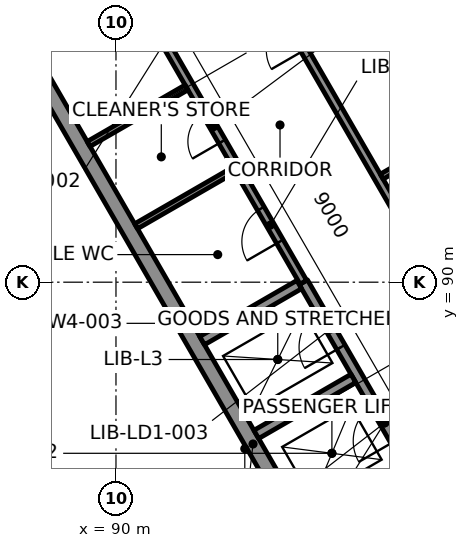
"""IFC4 building model, lengths in metres.
Left out: names, types, materials, properties, quantities, classifications, styles, units other than length and angle.
Written with IfcOpenShell. Run it as: python <this file> out.ifc"""

import sys

from ifc_helpers import new_model, si_unit, direction, frame, frame_2d, origin, origin_2d, place, context, subcontext, project, spatial, rectangle, extrude, element, fill, save


model = new_model("IFC4")
c1 = context("Model", 3, precision=1e-05, world=origin(), true_north=direction((0.0, 1.0)))
c2 = subcontext(c1, "Body", "Model", "MODEL_VIEW")
j1 = project(units=[si_unit("LENGTHUNIT", "METRE"), si_unit("PLANEANGLEUNIT", "RADIAN")], contexts=[c1])
p1 = place(None, origin())
s1 = spatial("IfcSite", under=j1, at=p1, CompositionType="ELEMENT")
p2 = place(p1, origin())
s2 = spatial("IfcBuilding", under=s1, at=p2, CompositionType="ELEMENT")
p3 = place(p2, origin())
s3 = spatial("IfcBuildingStorey", under=s2, at=p3, CompositionType="ELEMENT", Elevation=0.0)
for number, where, z_axis, x_axis in (
    (1, (92.22, 84.942, 0.0), (0.0, 0.0, 1.0), (-0.5, 0.866, 0.0)),
    (2, (87.421, 93.256, 0.0), (0.0, 0.0, 1.0), (-0.5, 0.866, 0.0)),
):
    element("IfcColumn", number, at=place(p3, frame(where, z_axis=z_axis, x_axis=x_axis)), inside=s3, PredefinedType="COLUMN", context=c2, shape_type="SweptSolid", body=[
        extrude(rectangle(XDim=1.2, YDim=1.5, at=origin_2d()), origin(), (0.0, 0.0, 1.0), 8.0),
    ])
p4 = place(p3, frame((81.775, 87.5, 0.0), z_axis=(0.0, 0.0, 1.0), x_axis=(1.0, 0.0, 0.0)))
e3 = element("IfcWall", 3, at=p4, inside=s3, PredefinedType="PARTITIONING", context=c2, shape_type="SweptSolid", body=[
    extrude(rectangle(XDim=9.662, YDim=0.15, at=frame_2d((4.831, 0.0))), origin(), (0.0, 0.0, 1.0), 6.865),
])
p5 = place(p4, frame((4.381, 0.0, 0.0)))
e4 = element("IfcOpeningElement", 4, at=p5, cuts=e3, PredefinedType="OPENING", context=c2, shape_type="SweptSolid", body=[
    extrude(rectangle(XDim=0.9, YDim=2.1, at=frame_2d((0.45, 1.05))), frame((0.0, 0.085, 0.0), z_axis=(0.0, -1.0, 0.0), x_axis=(1.0, 0.0, 0.0)), (0.0, 0.0, 1.0), 0.17),
])
p6 = place(p3, frame((91.5, 85.219, 0.0), z_axis=(0.0, 0.0, 1.0), x_axis=(0.0, 1.0, 0.0)))
e5 = element("IfcWall", 5, at=p6, inside=s3, PredefinedType="PARTITIONING", context=c2, shape_type="SweptSolid", body=[
    extrude(rectangle(XDim=2.17, YDim=0.15, at=frame_2d((1.085, 0.0))), origin(), (0.0, 0.0, 1.0), 6.865),
])
p7 = place(p3, frame((91.425, 84.821, 0.0), z_axis=(0.0, 0.0, 1.0), x_axis=(-0.4998141712, 0.866132665513, 0.0)))
e6 = element("IfcWall", 6, at=p7, inside=s3, PredefinedType="PARTITIONING", context=c2, shape_type="SweptSolid", body=[
    extrude(rectangle(XDim=0.307, YDim=0.15, at=frame_2d((0.154, 0.0))), origin(), (0.0, 0.0, 1.0), 7.1),
])
p8 = place(p3, frame((107.504, 60.451, 0.0), z_axis=(0.0, 0.0, 1.0), x_axis=(-0.500000550228, 0.86602508611, 0.0)))
e7 = element("IfcWall", 7, at=p8, inside=s3, PredefinedType="SOLIDWALL", context=c2, shape_type="SweptSolid", body=[
    extrude(rectangle(XDim=57.704, YDim=0.3, at=frame_2d((28.852, 0.0))), origin(), (0.0, 0.0, 1.0), 7.7),
])
p9 = place(p8, frame((56.104, 0.0, 0.0)))
e8 = element("IfcOpeningElement", 8, at=p9, cuts=e7, PredefinedType="OPENING", context=c2, shape_type="SweptSolid", body=[
    extrude(rectangle(XDim=1.2, YDim=2.4, at=frame_2d((0.6, 1.2))), frame((0.0, 0.16, 0.0), z_axis=(0.0, -1.0, 0.0), x_axis=(1.0, 0.0, 0.0)), (0.0, 0.0, 1.0), 0.32),
])
p10 = place(p8, frame((1.552, 0.0, 0.15)))
e9 = element("IfcOpeningElement", 9, at=p10, cuts=e7, PredefinedType="OPENING", context=c2, shape_type="SweptSolid", body=[
    extrude(rectangle(XDim=2.1, YDim=5.4, at=frame_2d((1.05, 2.7))), frame((0.0, 0.16, 0.0), z_axis=(0.0, -1.0, 0.0), x_axis=(1.0, 0.0, 0.0)), (0.0, 0.0, 1.0), 0.32),
])
p11 = place(p8, frame((4.052, 0.0, 0.15)))
e10 = element("IfcOpeningElement", 10, at=p11, cuts=e7, PredefinedType="OPENING", context=c2, shape_type="SweptSolid", body=[
    extrude(rectangle(XDim=2.1, YDim=5.4, at=frame_2d((1.05, 2.7))), frame((0.0, 0.16, 0.0), z_axis=(0.0, -1.0, 0.0), x_axis=(1.0, 0.0, 0.0)), (0.0, 0.0, 1.0), 0.32),
])
p12 = place(p8, frame((6.552, 0.0, 0.15)))
e11 = element("IfcOpeningElement", 11, at=p12, cuts=e7, PredefinedType="OPENING", context=c2, shape_type="SweptSolid", body=[
    extrude(rectangle(XDim=2.1, YDim=5.4, at=frame_2d((1.05, 2.7))), frame((0.0, 0.16, 0.0), z_axis=(0.0, -1.0, 0.0), x_axis=(1.0, 0.0, 0.0)), (0.0, 0.0, 1.0), 0.32),
])
p13 = place(p8, frame((9.052, 0.0, 0.15)))
e12 = element("IfcOpeningElement", 12, at=p13, cuts=e7, PredefinedType="OPENING", context=c2, shape_type="SweptSolid", body=[
    extrude(rectangle(XDim=2.1, YDim=5.4, at=frame_2d((1.05, 2.7))), frame((0.0, 0.16, 0.0), z_axis=(0.0, -1.0, 0.0), x_axis=(1.0, 0.0, 0.0)), (0.0, 0.0, 1.0), 0.32),
])
p14 = place(p8, frame((11.552, 0.0, 0.15)))
e13 = element("IfcOpeningElement", 13, at=p14, cuts=e7, PredefinedType="OPENING", context=c2, shape_type="SweptSolid", body=[
    extrude(rectangle(XDim=2.1, YDim=5.4, at=frame_2d((1.05, 2.7))), frame((0.0, 0.16, 0.0), z_axis=(0.0, -1.0, 0.0), x_axis=(1.0, 0.0, 0.0)), (0.0, 0.0, 1.0), 0.32),
])
p15 = place(p8, frame((14.052, 0.0, 0.15)))
e14 = element("IfcOpeningElement", 14, at=p15, cuts=e7, PredefinedType="OPENING", context=c2, shape_type="SweptSolid", body=[
    extrude(rectangle(XDim=2.1, YDim=5.4, at=frame_2d((1.05, 2.7))), frame((0.0, 0.16, 0.0), z_axis=(0.0, -1.0, 0.0), x_axis=(1.0, 0.0, 0.0)), (0.0, 0.0, 1.0), 0.32),
])
p16 = place(p8, frame((16.552, 0.0, 0.15)))
e15 = element("IfcOpeningElement", 15, at=p16, cuts=e7, PredefinedType="OPENING", context=c2, shape_type="SweptSolid", body=[
    extrude(rectangle(XDim=2.1, YDim=5.4, at=frame_2d((1.05, 2.7))), frame((0.0, 0.16, 0.0), z_axis=(0.0, -1.0, 0.0), x_axis=(1.0, 0.0, 0.0)), (0.0, 0.0, 1.0), 0.32),
])
p17 = place(p8, frame((19.052, 0.0, 0.15)))
e16 = element("IfcOpeningElement", 16, at=p17, cuts=e7, PredefinedType="OPENING", context=c2, shape_type="SweptSolid", body=[
    extrude(rectangle(XDim=2.1, YDim=5.4, at=frame_2d((1.05, 2.7))), frame((0.0, 0.16, 0.0), z_axis=(0.0, -1.0, 0.0), x_axis=(1.0, 0.0, 0.0)), (0.0, 0.0, 1.0), 0.32),
])
p18 = place(p8, frame((21.552, 0.0, 0.15)))
e17 = element("IfcOpeningElement", 17, at=p18, cuts=e7, PredefinedType="OPENING", context=c2, shape_type="SweptSolid", body=[
    extrude(rectangle(XDim=2.1, YDim=5.4, at=frame_2d((1.05, 2.7))), frame((0.0, 0.16, 0.0), z_axis=(0.0, -1.0, 0.0), x_axis=(1.0, 0.0, 0.0)), (0.0, 0.0, 1.0), 0.32),
])
p19 = place(p8, frame((24.052, 0.0, 0.15)))
e18 = element("IfcOpeningElement", 18, at=p19, cuts=e7, PredefinedType="OPENING", context=c2, shape_type="SweptSolid", body=[
    extrude(rectangle(XDim=2.1, YDim=5.4, at=frame_2d((1.05, 2.7))), frame((0.0, 0.16, 0.0), z_axis=(0.0, -1.0, 0.0), x_axis=(1.0, 0.0, 0.0)), (0.0, 0.0, 1.0), 0.32),
])
p20 = place(p8, frame((26.552, 0.0, 0.15)))
e19 = element("IfcOpeningElement", 19, at=p20, cuts=e7, PredefinedType="OPENING", context=c2, shape_type="SweptSolid", body=[
    extrude(rectangle(XDim=2.1, YDim=5.4, at=frame_2d((1.05, 2.7))), frame((0.0, 0.16, 0.0), z_axis=(0.0, -1.0, 0.0), x_axis=(1.0, 0.0, 0.0)), (0.0, 0.0, 1.0), 0.32),
])
p21 = place(p8, frame((29.052, 0.0, 0.15)))
e20 = element("IfcOpeningElement", 20, at=p21, cuts=e7, PredefinedType="OPENING", context=c2, shape_type="SweptSolid", body=[
    extrude(rectangle(XDim=2.1, YDim=5.4, at=frame_2d((1.05, 2.7))), frame((0.0, 0.16, 0.0), z_axis=(0.0, -1.0, 0.0), x_axis=(1.0, 0.0, 0.0)), (0.0, 0.0, 1.0), 0.32),
])
p22 = place(p8, frame((31.552, 0.0, 0.15)))
e21 = element("IfcOpeningElement", 21, at=p22, cuts=e7, PredefinedType="OPENING", context=c2, shape_type="SweptSolid", body=[
    extrude(rectangle(XDim=2.1, YDim=5.4, at=frame_2d((1.05, 2.7))), frame((0.0, 0.16, 0.0), z_axis=(0.0, -1.0, 0.0), x_axis=(1.0, 0.0, 0.0)), (0.0, 0.0, 1.0), 0.32),
])
p23 = place(p8, frame((34.052, 0.0, 0.15)))
e22 = element("IfcOpeningElement", 22, at=p23, cuts=e7, PredefinedType="OPENING", context=c2, shape_type="SweptSolid", body=[
    extrude(rectangle(XDim=2.1, YDim=5.4, at=frame_2d((1.05, 2.7))), frame((0.0, 0.16, 0.0), z_axis=(0.0, -1.0, 0.0), x_axis=(1.0, 0.0, 0.0)), (0.0, 0.0, 1.0), 0.32),
])
p24 = place(p8, frame((36.552, 0.0, 0.15)))
e23 = element("IfcOpeningElement", 23, at=p24, cuts=e7, PredefinedType="OPENING", context=c2, shape_type="SweptSolid", body=[
    extrude(rectangle(XDim=2.1, YDim=5.4, at=frame_2d((1.05, 2.7))), frame((0.0, 0.16, 0.0), z_axis=(0.0, -1.0, 0.0), x_axis=(1.0, 0.0, 0.0)), (0.0, 0.0, 1.0), 0.32),
])
p25 = place(p8, frame((39.052, 0.0, 0.15)))
e24 = element("IfcOpeningElement", 24, at=p25, cuts=e7, PredefinedType="OPENING", context=c2, shape_type="SweptSolid", body=[
    extrude(rectangle(XDim=2.1, YDim=5.4, at=frame_2d((1.05, 2.7))), frame((0.0, 0.16, 0.0), z_axis=(0.0, -1.0, 0.0), x_axis=(1.0, 0.0, 0.0)), (0.0, 0.0, 1.0), 0.32),
])
p26 = place(p8, frame((41.552, 0.0, 0.15)))
e25 = element("IfcOpeningElement", 25, at=p26, cuts=e7, PredefinedType="OPENING", context=c2, shape_type="SweptSolid", body=[
    extrude(rectangle(XDim=2.1, YDim=5.4, at=frame_2d((1.05, 2.7))), frame((0.0, 0.16, 0.0), z_axis=(0.0, -1.0, 0.0), x_axis=(1.0, 0.0, 0.0)), (0.0, 0.0, 1.0), 0.32),
])
p27 = place(p8, frame((44.052, 0.0, 0.15)))
e26 = element("IfcOpeningElement", 26, at=p27, cuts=e7, PredefinedType="OPENING", context=c2, shape_type="SweptSolid", body=[
    extrude(rectangle(XDim=2.1, YDim=5.4, at=frame_2d((1.05, 2.7))), frame((0.0, 0.16, 0.0), z_axis=(0.0, -1.0, 0.0), x_axis=(1.0, 0.0, 0.0)), (0.0, 0.0, 1.0), 0.32),
])
p28 = place(p8, frame((46.552, 0.0, 0.15)))
e27 = element("IfcOpeningElement", 27, at=p28, cuts=e7, PredefinedType="OPENING", context=c2, shape_type="SweptSolid", body=[
    extrude(rectangle(XDim=2.1, YDim=5.4, at=frame_2d((1.05, 2.7))), frame((0.0, 0.16, 0.0), z_axis=(0.0, -1.0, 0.0), x_axis=(1.0, 0.0, 0.0)), (0.0, 0.0, 1.0), 0.32),
])
p29 = place(p8, frame((49.052, 0.0, 0.15)))
e28 = element("IfcOpeningElement", 28, at=p29, cuts=e7, PredefinedType="OPENING", context=c2, shape_type="SweptSolid", body=[
    extrude(rectangle(XDim=2.1, YDim=5.4, at=frame_2d((1.05, 2.7))), frame((0.0, 0.16, 0.0), z_axis=(0.0, -1.0, 0.0), x_axis=(1.0, 0.0, 0.0)), (0.0, 0.0, 1.0), 0.32),
])
p30 = place(p8, frame((51.552, 0.0, 0.15)))
e29 = element("IfcOpeningElement", 29, at=p30, cuts=e7, PredefinedType="OPENING", context=c2, shape_type="SweptSolid", body=[
    extrude(rectangle(XDim=2.1, YDim=5.4, at=frame_2d((1.05, 2.7))), frame((0.0, 0.16, 0.0), z_axis=(0.0, -1.0, 0.0), x_axis=(1.0, 0.0, 0.0)), (0.0, 0.0, 1.0), 0.32),
])
p31 = place(p3, frame((107.106, 62.36, 0.0), z_axis=(0.0, 0.0, 1.0), x_axis=(-0.49999992739, 0.866025445706, 0.0)))
e30 = element("IfcWall", 30, at=p31, inside=s3, PredefinedType="SOLIDWALL", context=c2, shape_type="SweptSolid", body=[
    extrude(rectangle(XDim=54.0, YDim=0.4, at=frame_2d((27.0, 0.0))), origin(), (0.0, 0.0, 1.0), 7.64),
])
p32 = place(p3, frame((99.205, 82.595, 0.0), z_axis=(0.0, 0.0, 1.0), x_axis=(-0.500011643316, 0.866018681408, 0.0)))
e31 = element("IfcWall", 31, at=p32, inside=s3, PredefinedType="SOLIDWALL", context=c2, shape_type="SweptSolid", body=[
    extrude(rectangle(XDim=8.55, YDim=0.25, at=frame_2d((4.275, 0.0))), origin(), (0.0, 0.0, 1.0), 7.64),
])
p33 = place(p32, frame((0.875, 0.0, 0.0)))
e32 = element("IfcOpeningElement", 32, at=p33, cuts=e31, PredefinedType="OPENING", context=c2, shape_type="SweptSolid", body=[
    extrude(rectangle(XDim=1.1, YDim=2.1, at=frame_2d((0.55, 1.05))), frame((0.0, 0.135, 0.0), z_axis=(0.0, -1.0, 0.0), x_axis=(1.0, 0.0, 0.0)), (0.0, 0.0, 1.0), 0.27),
])
p34 = place(p32, frame((3.725, 0.0, 0.0)))
e33 = element("IfcOpeningElement", 33, at=p34, cuts=e31, PredefinedType="OPENING", context=c2, shape_type="SweptSolid", body=[
    extrude(rectangle(XDim=1.1, YDim=2.1, at=frame_2d((0.55, 1.05))), frame((0.0, 0.135, 0.0), z_axis=(0.0, -1.0, 0.0), x_axis=(1.0, 0.0, 0.0)), (0.0, 0.0, 1.0), 0.27),
])
p35 = place(p32, frame((6.575, 0.0, 0.0)))
e34 = element("IfcOpeningElement", 34, at=p35, cuts=e31, PredefinedType="OPENING", context=c2, shape_type="SweptSolid", body=[
    extrude(rectangle(XDim=1.1, YDim=2.1, at=frame_2d((0.55, 1.05))), frame((0.0, 0.135, 0.0), z_axis=(0.0, -1.0, 0.0), x_axis=(1.0, 0.0, 0.0)), (0.0, 0.0, 1.0), 0.27),
])
p36 = place(p3, frame((94.93, 90.0, 0.0), z_axis=(0.0, 0.0, 1.0), x_axis=(-0.499997667785, 0.866026750285, 0.0)))
e35 = element("IfcWall", 35, at=p36, inside=s3, PredefinedType="PARTITIONING", context=c2, shape_type="SweptSolid", body=[
    extrude(rectangle(XDim=14.59, YDim=0.2, at=frame_2d((7.295, 0.0))), origin(), (0.0, 0.0, 1.0), 7.64),
])
p37 = place(p36, frame((1.235, 0.0, 0.0)))
e36 = element("IfcOpeningElement", 36, at=p37, cuts=e35, PredefinedType="OPENING", context=c2, shape_type="SweptSolid", body=[
    extrude(rectangle(XDim=1.0, YDim=2.1, at=frame_2d((0.5, 1.05))), frame((0.0, 0.11, 0.0), z_axis=(0.0, -1.0, 0.0), x_axis=(1.0, 0.0, 0.0)), (0.0, 0.0, 1.0), 0.22),
])
p38 = place(p36, frame((4.275, 0.0, 0.0)))
e37 = element("IfcOpeningElement", 37, at=p38, cuts=e35, PredefinedType="OPENING", context=c2, shape_type="SweptSolid", body=[
    extrude(rectangle(XDim=0.9, YDim=2.1, at=frame_2d((0.45, 1.05))), frame((0.0, 0.11, 0.0), z_axis=(0.0, -1.0, 0.0), x_axis=(1.0, 0.0, 0.0)), (0.0, 0.0, 1.0), 0.22),
])
p39 = place(p36, frame((9.825, 0.0, 0.0)))
e38 = element("IfcOpeningElement", 38, at=p39, cuts=e35, PredefinedType="OPENING", context=c2, shape_type="SweptSolid", body=[
    extrude(rectangle(XDim=0.9, YDim=2.1, at=frame_2d((0.45, 1.05))), frame((0.0, 0.11, 0.0), z_axis=(0.0, -1.0, 0.0), x_axis=(1.0, 0.0, 0.0)), (0.0, 0.0, 1.0), 0.22),
])
for number, where, z_axis, x_axis in (
    (39, (95.117, 83.526, 0.0), (0.0, 0.0, 1.0), (0.866, 0.5, 0.0)),
    (40, (93.692, 85.994, 0.0), (0.0, 0.0, 1.0), (0.866, 0.5, 0.0)),
):
    element("IfcWall", number, at=place(p3, frame(where, z_axis=z_axis, x_axis=x_axis)), inside=s3, PredefinedType="SOLIDWALL", context=c2, shape_type="SweptSolid", body=[
        extrude(rectangle(XDim=2.95, YDim=0.25, at=frame_2d((1.475, 0.0))), origin(), (0.0, 0.0, 1.0), 7.64),
    ])
p40 = place(p3, frame((92.267, 88.462, 0.0), z_axis=(0.0, 0.0, 1.0), x_axis=(0.866024349092, 0.500001826776, 0.0)))
e41 = element("IfcWall", 41, at=p40, inside=s3, PredefinedType="SOLIDWALL", context=c2, shape_type="SweptSolid", body=[
    extrude(rectangle(XDim=2.95, YDim=0.25, at=frame_2d((1.475, 0.0))), origin(), (0.0, 0.0, 1.0), 7.64),
])
for number, where, z_axis, x_axis in (
    (42, (90.529, 91.471, 0.0), (0.0, 0.0, 1.0), (0.866, 0.5, 0.0)),
    (43, (89.279, 93.636, 0.0), (0.0, 0.0, 1.0), (0.866, 0.5, 0.0)),
):
    element("IfcWall", number, at=place(p3, frame(where, z_axis=z_axis, x_axis=x_axis)), inside=s3, PredefinedType="PARTITIONING", context=c2, shape_type="SweptSolid", body=[
        extrude(rectangle(XDim=2.975, YDim=0.15, at=frame_2d((1.488, 0.0))), origin(), (0.0, 0.0, 1.0), 7.64),
    ])
p41 = place(p3, frame((112.456, 65.794, 0.0), z_axis=(0.0, 0.0, 1.0), x_axis=(-0.499998559706, 0.866026235337, 0.0)))
e44 = element("IfcWall", 44, at=p41, inside=s3, PredefinedType="PARTITIONING", context=c2, shape_type="SweptSolid", body=[
    extrude(rectangle(XDim=53.4, YDim=0.2, at=frame_2d((26.7, 0.0))), origin(), (0.0, 0.0, 1.0), 7.64),
])
p42 = place(p41, frame((12.6, 0.0, 0.0)))
e45 = element("IfcOpeningElement", 45, at=p42, cuts=e44, PredefinedType="OPENING", context=c2, shape_type="SweptSolid", body=[
    extrude(rectangle(XDim=1.8, YDim=2.1, at=frame_2d((0.9, 1.05))), frame((0.0, 0.11, 0.0), z_axis=(0.0, -1.0, 0.0), x_axis=(1.0, 0.0, 0.0)), (0.0, 0.0, 1.0), 0.22),
])
p43 = place(p41, frame((25.8, 0.0, 0.0)))
e46 = element("IfcOpeningElement", 46, at=p43, cuts=e44, PredefinedType="OPENING", context=c2, shape_type="SweptSolid", body=[
    extrude(rectangle(XDim=1.8, YDim=2.1, at=frame_2d((0.9, 1.05))), frame((0.0, 0.11, 0.0), z_axis=(0.0, -1.0, 0.0), x_axis=(1.0, 0.0, 0.0)), (0.0, 0.0, 1.0), 0.22),
])
p44 = place(p41, frame((35.0, 0.0, 0.0)))
e47 = element("IfcOpeningElement", 47, at=p44, cuts=e44, PredefinedType="OPENING", context=c2, shape_type="SweptSolid", body=[
    extrude(rectangle(XDim=1.0, YDim=2.1, at=frame_2d((0.5, 1.05))), frame((0.0, 0.11, 0.0), z_axis=(0.0, -1.0, 0.0), x_axis=(1.0, 0.0, 0.0)), (0.0, 0.0, 1.0), 0.22),
])
p45 = place(p41, frame((45.75, 0.0, 0.0)))
e48 = element("IfcOpeningElement", 48, at=p45, cuts=e44, PredefinedType="OPENING", context=c2, shape_type="SweptSolid", body=[
    extrude(rectangle(XDim=1.8, YDim=2.1, at=frame_2d((0.9, 1.05))), frame((0.0, 0.11, 0.0), z_axis=(0.0, -1.0, 0.0), x_axis=(1.0, 0.0, 0.0)), (0.0, 0.0, 1.0), 0.22),
])
p46 = place(p3, frame((96.992, 92.778, 0.0), z_axis=(0.0, 0.0, 1.0), x_axis=(0.866027547497, 0.499996286962, 0.0)))
e49 = element("IfcWall", 49, at=p46, inside=s3, PredefinedType="PARTITIONING", context=c2, shape_type="SweptSolid", body=[
    extrude(rectangle(XDim=23.05, YDim=0.15, at=frame_2d((11.525, 0.0))), origin(), (0.0, 0.0, 1.0), 7.64),
])
p47 = place(p20, origin())
e50 = element("IfcWindow", 50, at=p47, inside=s3, PartitioningType="SINGLE_PANEL", PredefinedType="WINDOW", context=c2, shape_type="SweptSolid", body=[
    extrude(rectangle(XDim=2.1, YDim=5.4, at=frame_2d((1.05, 2.7))), frame((0.0, 0.03, 0.0), z_axis=(0.0, -1.0, 0.0), x_axis=(1.0, 0.0, 0.0)), (0.0, 0.0, 1.0), 0.06),
])
fill(e19, e50)
p48 = place(p21, origin())
e51 = element("IfcWindow", 51, at=p48, inside=s3, PartitioningType="SINGLE_PANEL", PredefinedType="WINDOW", context=c2, shape_type="SweptSolid", body=[
    extrude(rectangle(XDim=2.1, YDim=5.4, at=frame_2d((1.05, 2.7))), frame((0.0, 0.03, 0.0), z_axis=(0.0, -1.0, 0.0), x_axis=(1.0, 0.0, 0.0)), (0.0, 0.0, 1.0), 0.06),
])
fill(e20, e51)
p49 = place(p22, origin())
e52 = element("IfcWindow", 52, at=p49, inside=s3, PartitioningType="SINGLE_PANEL", PredefinedType="WINDOW", context=c2, shape_type="SweptSolid", body=[
    extrude(rectangle(XDim=2.1, YDim=5.4, at=frame_2d((1.05, 2.7))), frame((0.0, 0.03, 0.0), z_axis=(0.0, -1.0, 0.0), x_axis=(1.0, 0.0, 0.0)), (0.0, 0.0, 1.0), 0.06),
])
fill(e21, e52)
p50 = place(p23, origin())
e53 = element("IfcWindow", 53, at=p50, inside=s3, PartitioningType="SINGLE_PANEL", PredefinedType="WINDOW", context=c2, shape_type="SweptSolid", body=[
    extrude(rectangle(XDim=2.1, YDim=5.4, at=frame_2d((1.05, 2.7))), frame((0.0, 0.03, 0.0), z_axis=(0.0, -1.0, 0.0), x_axis=(1.0, 0.0, 0.0)), (0.0, 0.0, 1.0), 0.06),
])
fill(e22, e53)
p51 = place(p24, origin())
e54 = element("IfcWindow", 54, at=p51, inside=s3, PartitioningType="SINGLE_PANEL", PredefinedType="WINDOW", context=c2, shape_type="SweptSolid", body=[
    extrude(rectangle(XDim=2.1, YDim=5.4, at=frame_2d((1.05, 2.7))), frame((0.0, 0.03, 0.0), z_axis=(0.0, -1.0, 0.0), x_axis=(1.0, 0.0, 0.0)), (0.0, 0.0, 1.0), 0.06),
])
fill(e23, e54)
p52 = place(p37, origin())
e55 = element("IfcDoor", 55, at=p52, inside=s3, OperationType="SINGLE_SWING_LEFT", PredefinedType="DOOR", context=c2, shape_type="SweptSolid", body=[
    extrude(rectangle(XDim=1.0, YDim=2.1, at=frame_2d((0.5, 1.05))), frame((0.0, 0.025, 0.0), z_axis=(0.0, -1.0, 0.0), x_axis=(1.0, 0.0, 0.0)), (0.0, 0.0, 1.0), 0.05),
])
fill(e36, e55)
p53 = place(p38, origin())
e56 = element("IfcDoor", 56, at=p53, inside=s3, OperationType="SINGLE_SWING_RIGHT", PredefinedType="DOOR", context=c2, shape_type="SweptSolid", body=[
    extrude(rectangle(XDim=0.9, YDim=2.1, at=frame_2d((0.45, 1.05))), frame((0.0, 0.025, 0.0), z_axis=(0.0, -1.0, 0.0), x_axis=(1.0, 0.0, 0.0)), (0.0, 0.0, 1.0), 0.05),
])
fill(e37, e56)
p54 = place(p34, origin())
e57 = element("IfcDoor", 57, at=p54, inside=s3, OperationType="DOUBLE_DOOR_SLIDING", PredefinedType="DOOR", context=c2, shape_type="SweptSolid", body=[
    extrude(rectangle(XDim=1.1, YDim=2.1, at=frame_2d((0.55, 1.05))), frame((0.0, 0.025, 0.0), z_axis=(0.0, -1.0, 0.0), x_axis=(1.0, 0.0, 0.0)), (0.0, 0.0, 1.0), 0.05),
])
fill(e33, e57)
p55 = place(p35, origin())
e58 = element("IfcDoor", 58, at=p55, inside=s3, OperationType="DOUBLE_DOOR_SLIDING", PredefinedType="DOOR", context=c2, shape_type="SweptSolid", body=[
    extrude(rectangle(XDim=1.1, YDim=2.1, at=frame_2d((0.55, 1.05))), frame((0.0, 0.025, 0.0), z_axis=(0.0, -1.0, 0.0), x_axis=(1.0, 0.0, 0.0)), (0.0, 0.0, 1.0), 0.05),
])
fill(e34, e58)
save(model, sys.argv[1])
